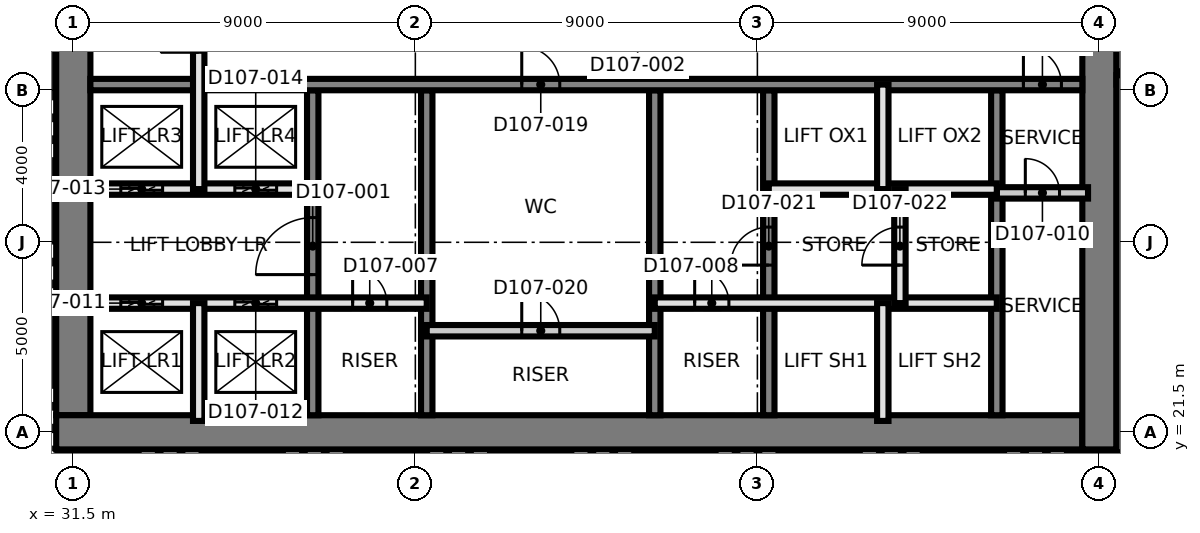
"""IFC4 building model, lengths in metres.
Left out: names, types, materials, properties, quantities, classifications, styles, units other than length and angle.
Written with IfcOpenShell. Run it as: python <this file> out.ifc"""

import sys

from ifc_helpers import new_model, si_unit, direction, frame, frame_2d, origin, place, context, subcontext, project, spatial, rectangle, extrude, element, fill, save


model = new_model("IFC4")
c1 = context("Model", 3, precision=1e-05, world=origin(), true_north=direction((0.0, 1.0)))
c2 = subcontext(c1, "Body", "Model", "MODEL_VIEW")
j1 = project(units=[si_unit("LENGTHUNIT", "METRE"), si_unit("PLANEANGLEUNIT", "RADIAN")], contexts=[c1])
p1 = place(None, origin())
s1 = spatial("IfcSite", under=j1, at=p1, CompositionType="ELEMENT")
p2 = place(p1, origin())
s2 = spatial("IfcBuilding", under=s1, at=p2, CompositionType="ELEMENT")
p3 = place(p2, frame((0.0, 0.0, 28.5)))
s3 = spatial("IfcBuildingStorey", under=s2, at=p3, CompositionType="ELEMENT", Elevation=28.5)
p4 = place(p3, frame((31.5, 21.95, 0.0), z_axis=(0.0, 0.0, 1.0), x_axis=(0.0, 1.0, 0.0)))
e1 = element("IfcWall", 1, at=p4, inside=s3, PredefinedType="SHEAR", context=c2, shape_type="SweptSolid", body=[
    extrude(rectangle(XDim=17.1, YDim=0.9, at=frame_2d((8.55, 0.0))), origin(), (0.0, 0.0, 1.0), 5.0),
])
p5 = place(p3, frame((31.05, 21.5, 0.0), z_axis=(0.0, 0.0, 1.0), x_axis=(1.0, 0.0, 0.0)))
e2 = element("IfcWall", 2, at=p5, inside=s3, PredefinedType="SHEAR", context=c2, shape_type="SweptSolid", body=[
    extrude(rectangle(XDim=27.0, YDim=0.9, at=frame_2d((13.5, 0.0))), origin(), (0.0, 0.0, 1.0), 5.0),
])
p6 = place(p3, frame((58.5, 21.05, 0.0), z_axis=(0.0, 0.0, 1.0), x_axis=(0.0, 1.0, 0.0)))
e3 = element("IfcWall", 3, at=p6, inside=s3, PredefinedType="SHEAR", context=c2, shape_type="SweptSolid", body=[
    extrude(rectangle(XDim=18.9, YDim=0.9, at=frame_2d((9.45, 0.0))), origin(), (0.0, 0.0, 1.0), 5.0),
])
p7 = place(p3, frame((37.8, 21.95, 0.0), z_axis=(0.0, 0.0, 1.0), x_axis=(0.0, 1.0, 0.0)))
e4 = element("IfcWall", 4, at=p7, inside=s3, PredefinedType="SHEAR", context=c2, shape_type="SweptSolid", body=[
    extrude(rectangle(XDim=8.55, YDim=0.3, at=frame_2d((4.275, 0.0))), origin(), (0.0, 0.0, 1.0), 5.0),
])
p8 = place(p7, frame((3.7, 0.0, 0.0)))
e5 = element("IfcOpeningElement", 5, at=p8, cuts=e4, PredefinedType="OPENING", context=c2, shape_type="SweptSolid", body=[
    extrude(rectangle(XDim=1.5, YDim=2.1, at=frame_2d((0.75, 1.05))), frame((0.0, 0.16, 0.0), z_axis=(0.0, -1.0, 0.0), x_axis=(1.0, 0.0, 0.0)), (0.0, 0.0, 1.0), 0.32),
])
for number, where, z_axis, x_axis in (
    (6, (40.8, 21.95, 0.0), (0.0, 0.0, 1.0), (0.0, 1.0, 0.0)),
    (7, (46.8, 21.95, 0.0), (0.0, 0.0, 1.0), (0.0, 1.0, 0.0)),
):
    element("IfcWall", number, at=place(p3, frame(where, z_axis=z_axis, x_axis=x_axis)), inside=s3, PredefinedType="SHEAR", context=c2, shape_type="SweptSolid", body=[
        extrude(rectangle(XDim=8.55, YDim=0.3, at=frame_2d((4.275, 0.0))), origin(), (0.0, 0.0, 1.0), 5.0),
    ])
p9 = place(p3, frame((49.8, 21.95, 0.0), z_axis=(0.0, 0.0, 1.0), x_axis=(0.0, 1.0, 0.0)))
e8 = element("IfcWall", 8, at=p9, inside=s3, PredefinedType="SHEAR", context=c2, shape_type="SweptSolid", body=[
    extrude(rectangle(XDim=8.55, YDim=0.3, at=frame_2d((4.275, 0.0))), origin(), (0.0, 0.0, 1.0), 5.0),
])
p10 = place(p9, frame((3.95, 0.0, 0.0)))
e9 = element("IfcOpeningElement", 9, at=p10, cuts=e8, PredefinedType="OPENING", context=c2, shape_type="SweptSolid", body=[
    extrude(rectangle(XDim=1.0, YDim=2.1, at=frame_2d((0.5, 1.05))), frame((0.0, 0.16, 0.0), z_axis=(0.0, -1.0, 0.0), x_axis=(1.0, 0.0, 0.0)), (0.0, 0.0, 1.0), 0.32),
])
p11 = place(p3, frame((55.8, 21.95, 0.0), z_axis=(0.0, 0.0, 1.0), x_axis=(0.0, 1.0, 0.0)))
e10 = element("IfcWall", 10, at=p11, inside=s3, PredefinedType="SHEAR", context=c2, shape_type="SweptSolid", body=[
    extrude(rectangle(XDim=8.55, YDim=0.3, at=frame_2d((4.275, 0.0))), origin(), (0.0, 0.0, 1.0), 5.0),
])
p12 = place(p3, frame((31.95, 30.65, 0.0), z_axis=(0.0, 0.0, 1.0), x_axis=(1.0, 0.0, 0.0)))
e11 = element("IfcWall", 11, at=p12, inside=s3, PredefinedType="SHEAR", context=c2, shape_type="SweptSolid", body=[
    extrude(rectangle(XDim=26.1, YDim=0.3, at=frame_2d((13.05, 0.0))), origin(), (0.0, 0.0, 1.0), 5.0),
])
p13 = place(p12, frame((24.55, 0.0, 0.0)))
e12 = element("IfcOpeningElement", 12, at=p13, cuts=e11, PredefinedType="OPENING", context=c2, shape_type="SweptSolid", body=[
    extrude(rectangle(XDim=1.0, YDim=2.1, at=frame_2d((0.5, 1.05))), frame((0.0, 0.16, 0.0), z_axis=(0.0, -1.0, 0.0), x_axis=(1.0, 0.0, 0.0)), (0.0, 0.0, 1.0), 0.32),
])
p14 = place(p12, frame((11.35, 0.0, 0.0)))
e13 = element("IfcOpeningElement", 13, at=p14, cuts=e11, PredefinedType="OPENING", context=c2, shape_type="SweptSolid", body=[
    extrude(rectangle(XDim=1.0, YDim=2.1, at=frame_2d((0.5, 1.05))), frame((0.0, 0.16, 0.0), z_axis=(0.0, -1.0, 0.0), x_axis=(1.0, 0.0, 0.0)), (0.0, 0.0, 1.0), 0.32),
])
p15 = place(p3, frame((40.8, 24.173, 0.0), z_axis=(0.0, 0.0, 1.0), x_axis=(1.0, 0.0, 0.0)))
e14 = element("IfcWall", 14, at=p15, inside=s3, PredefinedType="PARTITIONING", context=c2, shape_type="SweptSolid", body=[
    extrude(rectangle(XDim=6.0, YDim=0.3, at=frame_2d((3.0, 0.0))), origin(), (0.0, 0.0, 1.0), 4.7),
])
p16 = place(p15, frame((2.5, 0.0, 0.0)))
e15 = element("IfcOpeningElement", 15, at=p16, cuts=e14, PredefinedType="OPENING", context=c2, shape_type="SweptSolid", body=[
    extrude(rectangle(XDim=1.0, YDim=2.1, at=frame_2d((0.5, 1.05))), frame((0.0, 0.16, 0.0), z_axis=(0.0, -1.0, 0.0), x_axis=(1.0, 0.0, 0.0)), (0.0, 0.0, 1.0), 0.32),
])
p17 = place(p3, frame((31.8, 24.9, 0.0), z_axis=(0.0, 0.0, 1.0), x_axis=(1.0, 0.0, 0.0)))
e16 = element("IfcWall", 16, at=p17, inside=s3, PredefinedType="SOLIDWALL", context=c2, shape_type="SweptSolid", body=[
    extrude(rectangle(XDim=9.0, YDim=0.3, at=frame_2d((4.5, 0.0))), origin(), (0.0, 0.0, 1.0), 4.7),
])
p18 = place(p17, frame((7.05, 0.0, 0.0)))
e17 = element("IfcOpeningElement", 17, at=p18, cuts=e16, PredefinedType="OPENING", context=c2, shape_type="SweptSolid", body=[
    extrude(rectangle(XDim=0.9, YDim=2.1, at=frame_2d((0.45, 1.05))), frame((0.0, 0.16, 0.0), z_axis=(0.0, -1.0, 0.0), x_axis=(1.0, 0.0, 0.0)), (0.0, 0.0, 1.0), 0.32),
])
p19 = place(p17, frame((0.95, 0.0, 0.0)))
e18 = element("IfcOpeningElement", 18, at=p19, cuts=e16, PredefinedType="OPENING", context=c2, shape_type="SweptSolid", body=[
    extrude(rectangle(XDim=1.1, YDim=2.4, at=frame_2d((0.55, 1.2))), frame((0.0, 0.16, 0.0), z_axis=(0.0, -1.0, 0.0), x_axis=(1.0, 0.0, 0.0)), (0.0, 0.0, 1.0), 0.32),
])
p20 = place(p17, frame((3.95, 0.0, 0.0)))
e19 = element("IfcOpeningElement", 19, at=p20, cuts=e16, PredefinedType="OPENING", context=c2, shape_type="SweptSolid", body=[
    extrude(rectangle(XDim=1.1, YDim=2.4, at=frame_2d((0.55, 1.2))), frame((0.0, 0.16, 0.0), z_axis=(0.0, -1.0, 0.0), x_axis=(1.0, 0.0, 0.0)), (0.0, 0.0, 1.0), 0.32),
])
p21 = place(p3, frame((46.8, 24.9, 0.0), z_axis=(0.0, 0.0, 1.0), x_axis=(1.0, 0.0, 0.0)))
e20 = element("IfcWall", 20, at=p21, inside=s3, PredefinedType="SOLIDWALL", context=c2, shape_type="SweptSolid", body=[
    extrude(rectangle(XDim=9.0, YDim=0.3, at=frame_2d((4.5, 0.0))), origin(), (0.0, 0.0, 1.0), 4.7),
])
p22 = place(p21, frame((1.05, 0.0, 0.0)))
e21 = element("IfcOpeningElement", 21, at=p22, cuts=e20, PredefinedType="OPENING", context=c2, shape_type="SweptSolid", body=[
    extrude(rectangle(XDim=0.9, YDim=2.1, at=frame_2d((0.45, 1.05))), frame((0.0, 0.16, 0.0), z_axis=(0.0, -1.0, 0.0), x_axis=(1.0, 0.0, 0.0)), (0.0, 0.0, 1.0), 0.32),
])
p23 = place(p3, frame((55.8, 27.8, 0.0), z_axis=(0.0, 0.0, 1.0), x_axis=(1.0, 0.0, 0.0)))
e22 = element("IfcWall", 22, at=p23, inside=s3, PredefinedType="PARTITIONING", context=c2, shape_type="SweptSolid", body=[
    extrude(rectangle(XDim=2.4, YDim=0.3, at=frame_2d((1.2, 0.0))), origin(), (0.0, 0.0, 1.0), 4.7),
])
p24 = place(p23, frame((0.75, 0.0, 0.0)))
e23 = element("IfcOpeningElement", 23, at=p24, cuts=e22, PredefinedType="OPENING", context=c2, shape_type="SweptSolid", body=[
    extrude(rectangle(XDim=0.9, YDim=2.1, at=frame_2d((0.45, 1.05))), frame((0.0, 0.16, 0.0), z_axis=(0.0, -1.0, 0.0), x_axis=(1.0, 0.0, 0.0)), (0.0, 0.0, 1.0), 0.32),
])
p25 = place(p3, frame((31.8, 27.9, 0.0), z_axis=(0.0, 0.0, 1.0), x_axis=(1.0, 0.0, 0.0)))
e24 = element("IfcWall", 24, at=p25, inside=s3, PredefinedType="SOLIDWALL", context=c2, shape_type="SweptSolid", body=[
    extrude(rectangle(XDim=6.0, YDim=0.3, at=frame_2d((3.0, 0.0))), origin(), (0.0, 0.0, 1.0), 4.7),
])
p26 = place(p25, frame((0.95, 0.0, 0.0)))
e25 = element("IfcOpeningElement", 25, at=p26, cuts=e24, PredefinedType="OPENING", context=c2, shape_type="SweptSolid", body=[
    extrude(rectangle(XDim=1.1, YDim=2.4, at=frame_2d((0.55, 1.2))), frame((0.0, 0.16, 0.0), z_axis=(0.0, -1.0, 0.0), x_axis=(1.0, 0.0, 0.0)), (0.0, 0.0, 1.0), 0.32),
])
p27 = place(p25, frame((3.95, 0.0, 0.0)))
e26 = element("IfcOpeningElement", 26, at=p27, cuts=e24, PredefinedType="OPENING", context=c2, shape_type="SweptSolid", body=[
    extrude(rectangle(XDim=1.1, YDim=2.4, at=frame_2d((0.55, 1.2))), frame((0.0, 0.16, 0.0), z_axis=(0.0, -1.0, 0.0), x_axis=(1.0, 0.0, 0.0)), (0.0, 0.0, 1.0), 0.32),
])
p28 = place(p3, frame((49.8, 27.9, 0.0), z_axis=(0.0, 0.0, 1.0), x_axis=(1.0, 0.0, 0.0)))
e27 = element("IfcWall", 27, at=p28, inside=s3, PredefinedType="SOLIDWALL", context=c2, shape_type="SweptSolid", body=[
    extrude(rectangle(XDim=6.0, YDim=0.3, at=frame_2d((3.0, 0.0))), origin(), (0.0, 0.0, 1.0), 4.7),
])
p29 = place(p3, frame((34.8, 21.8, 0.0), z_axis=(0.0, 0.0, 1.0), x_axis=(0.0, 1.0, 0.0)))
e28 = element("IfcWall", 28, at=p29, inside=s3, PredefinedType="SOLIDWALL", context=c2, shape_type="SweptSolid", body=[
    extrude(rectangle(XDim=3.1, YDim=0.3, at=frame_2d((1.55, 0.0))), origin(), (0.0, 0.0, 1.0), 4.7),
])
p30 = place(p3, frame((34.8, 27.9, 0.0), z_axis=(0.0, 0.0, 1.0), x_axis=(0.0, 1.0, 0.0)))
e29 = element("IfcWall", 29, at=p30, inside=s3, PredefinedType="SOLIDWALL", context=c2, shape_type="SweptSolid", body=[
    extrude(rectangle(XDim=5.45, YDim=0.3, at=frame_2d((2.725, 0.0))), origin(), (0.0, 0.0, 1.0), 4.7),
])
p31 = place(p30, frame((3.6, 0.0, 0.0)))
e30 = element("IfcOpeningElement", 30, at=p31, cuts=e29, PredefinedType="OPENING", context=c2, shape_type="SweptSolid", body=[
    extrude(rectangle(XDim=1.0, YDim=2.1, at=frame_2d((0.5, 1.05))), frame((0.0, 0.16, 0.0), z_axis=(0.0, -1.0, 0.0), x_axis=(1.0, 0.0, 0.0)), (0.0, 0.0, 1.0), 0.32),
])
p32 = place(p3, frame((52.8, 21.8, 0.0), z_axis=(0.0, 0.0, 1.0), x_axis=(0.0, 1.0, 0.0)))
e31 = element("IfcWall", 31, at=p32, inside=s3, PredefinedType="SOLIDWALL", context=c2, shape_type="SweptSolid", body=[
    extrude(rectangle(XDim=3.1, YDim=0.3, at=frame_2d((1.55, 0.0))), origin(), (0.0, 0.0, 1.0), 4.7),
])
p33 = place(p3, frame((52.8, 27.9, 0.0), z_axis=(0.0, 0.0, 1.0), x_axis=(0.0, 1.0, 0.0)))
e32 = element("IfcWall", 32, at=p33, inside=s3, PredefinedType="SOLIDWALL", context=c2, shape_type="SweptSolid", body=[
    extrude(rectangle(XDim=2.75, YDim=0.3, at=frame_2d((1.375, 0.0))), origin(), (0.0, 0.0, 1.0), 4.7),
])
p34 = place(p3, frame((53.25, 24.9, 0.0), z_axis=(0.0, 0.0, 1.0), x_axis=(0.0, 1.0, 0.0)))
e33 = element("IfcWall", 33, at=p34, inside=s3, PredefinedType="SOLIDWALL", context=c2, shape_type="SweptSolid", body=[
    extrude(rectangle(XDim=3.0, YDim=0.3, at=frame_2d((1.5, 0.0))), origin(), (0.0, 0.0, 1.0), 4.7),
])
p35 = place(p34, frame((1.0, 0.0, 0.0)))
e34 = element("IfcOpeningElement", 34, at=p35, cuts=e33, PredefinedType="OPENING", context=c2, shape_type="SweptSolid", body=[
    extrude(rectangle(XDim=1.0, YDim=2.1, at=frame_2d((0.5, 1.05))), frame((0.0, 0.16, 0.0), z_axis=(0.0, -1.0, 0.0), x_axis=(1.0, 0.0, 0.0)), (0.0, 0.0, 1.0), 0.32),
])
p36 = place(p3, frame((59.1, 30.65, 0.0), z_axis=(0.0, 0.0, 1.0), x_axis=(0.0, 1.0, 0.0)))
e35 = element("IfcWall", 35, at=p36, inside=s3, PredefinedType="PARTITIONING", context=c2, shape_type="SweptSolid", body=[
    extrude(rectangle(XDim=2.7, YDim=0.3, at=frame_2d((1.35, 0.0))), origin(), (0.0, 0.0, 1.0), 4.7),
])
p37 = place(p3, frame((58.97, 30.9, 0.0), z_axis=(0.0, 0.0, 1.0), x_axis=(1.0, 0.0, 0.0)))
e36 = element("IfcWall", 36, at=p37, inside=s3, PredefinedType="PARTITIONING", context=c2, shape_type="SweptSolid", body=[
    extrude(rectangle(XDim=23.53, YDim=0.2, at=frame_2d((11.765, 0.0))), origin(), (0.0, 0.0, 1.0), 4.7),
])
p38 = place(p37, frame((13.18, 0.0, 0.0)))
e37 = element("IfcOpeningElement", 37, at=p38, cuts=e36, PredefinedType="OPENING", context=c2, shape_type="SweptSolid", body=[
    extrude(rectangle(XDim=1.0, YDim=2.1, at=frame_2d((0.5, 1.05))), frame((0.0, 0.11, 0.0), z_axis=(0.0, -1.0, 0.0), x_axis=(1.0, 0.0, 0.0)), (0.0, 0.0, 1.0), 0.22),
])
p39 = place(p3, frame((59.05, 11.07, 0.0), z_axis=(0.0, 0.0, 1.0), x_axis=(0.0, 1.0, 0.0)))
e38 = element("IfcWall", 38, at=p39, inside=s3, PredefinedType="PARTITIONING", context=c2, shape_type="SweptSolid", body=[
    extrude(rectangle(XDim=19.83, YDim=0.2, at=frame_2d((9.915, 0.0))), origin(), (0.0, 0.0, 1.0), 4.7),
])
p40 = place(p8, origin())
e39 = element("IfcDoor", 39, at=p40, inside=s3, OperationType="SINGLE_SWING_LEFT", PredefinedType="DOOR", context=c2, shape_type="SweptSolid", body=[
    extrude(rectangle(XDim=1.5, YDim=2.1, at=frame_2d((0.75, 1.05))), frame((0.0, 0.025, 0.0), z_axis=(0.0, -1.0, 0.0), x_axis=(1.0, 0.0, 0.0)), (0.0, 0.0, 1.0), 0.05),
])
fill(e5, e39)
p41 = place(p18, origin())
e40 = element("IfcDoor", 40, at=p41, inside=s3, OperationType="SINGLE_SWING_LEFT", PredefinedType="DOOR", context=c2, shape_type="SweptSolid", body=[
    extrude(rectangle(XDim=0.9, YDim=2.1, at=frame_2d((0.45, 1.05))), frame((0.0, 0.025, 0.0), z_axis=(0.0, -1.0, 0.0), x_axis=(1.0, 0.0, 0.0)), (0.0, 0.0, 1.0), 0.05),
])
fill(e17, e40)
p42 = place(p22, origin())
e41 = element("IfcDoor", 41, at=p42, inside=s3, OperationType="SINGLE_SWING_RIGHT", PredefinedType="DOOR", context=c2, shape_type="SweptSolid", body=[
    extrude(rectangle(XDim=0.9, YDim=2.1, at=frame_2d((0.45, 1.05))), frame((0.0, 0.025, 0.0), z_axis=(0.0, -1.0, 0.0), x_axis=(1.0, 0.0, 0.0)), (0.0, 0.0, 1.0), 0.05),
])
fill(e21, e41)
p43 = place(p13, origin())
e42 = element("IfcDoor", 42, at=p43, inside=s3, OperationType="SINGLE_SWING_LEFT", PredefinedType="DOOR", context=c2, shape_type="SweptSolid", body=[
    extrude(rectangle(XDim=1.0, YDim=2.1, at=frame_2d((0.5, 1.05))), frame((0.0, 0.025, 0.0), z_axis=(0.0, -1.0, 0.0), x_axis=(1.0, 0.0, 0.0)), (0.0, 0.0, 1.0), 0.05),
])
fill(e12, e42)
p44 = place(p24, origin())
e43 = element("IfcDoor", 43, at=p44, inside=s3, OperationType="SINGLE_SWING_RIGHT", PredefinedType="DOOR", context=c2, shape_type="SweptSolid", body=[
    extrude(rectangle(XDim=0.9, YDim=2.1, at=frame_2d((0.45, 1.05))), frame((0.0, 0.025, 0.0), z_axis=(0.0, -1.0, 0.0), x_axis=(1.0, 0.0, 0.0)), (0.0, 0.0, 1.0), 0.05),
])
fill(e23, e43)
p45 = place(p19, origin())
e44 = element("IfcDoor", 44, at=p45, inside=s3, OperationType="SLIDING_TO_LEFT", PredefinedType="DOOR", context=c2, shape_type="SweptSolid", body=[
    extrude(rectangle(XDim=1.1, YDim=2.4, at=frame_2d((0.55, 1.2))), frame((0.0, 0.025, 0.0), z_axis=(0.0, -1.0, 0.0), x_axis=(1.0, 0.0, 0.0)), (0.0, 0.0, 1.0), 0.05),
])
fill(e18, e44)
p46 = place(p20, origin())
e45 = element("IfcDoor", 45, at=p46, inside=s3, OperationType="SLIDING_TO_LEFT", PredefinedType="DOOR", context=c2, shape_type="SweptSolid", body=[
    extrude(rectangle(XDim=1.1, YDim=2.4, at=frame_2d((0.55, 1.2))), frame((0.0, 0.025, 0.0), z_axis=(0.0, -1.0, 0.0), x_axis=(1.0, 0.0, 0.0)), (0.0, 0.0, 1.0), 0.05),
])
fill(e19, e45)
p47 = place(p26, origin())
e46 = element("IfcDoor", 46, at=p47, inside=s3, OperationType="SLIDING_TO_LEFT", PredefinedType="DOOR", context=c2, shape_type="SweptSolid", body=[
    extrude(rectangle(XDim=1.1, YDim=2.4, at=frame_2d((0.55, 1.2))), frame((0.0, 0.025, 0.0), z_axis=(0.0, -1.0, 0.0), x_axis=(1.0, 0.0, 0.0)), (0.0, 0.0, 1.0), 0.05),
])
fill(e25, e46)
p48 = place(p27, origin())
e47 = element("IfcDoor", 47, at=p48, inside=s3, OperationType="SLIDING_TO_LEFT", PredefinedType="DOOR", context=c2, shape_type="SweptSolid", body=[
    extrude(rectangle(XDim=1.1, YDim=2.4, at=frame_2d((0.55, 1.2))), frame((0.0, 0.025, 0.0), z_axis=(0.0, -1.0, 0.0), x_axis=(1.0, 0.0, 0.0)), (0.0, 0.0, 1.0), 0.05),
])
fill(e26, e47)
p49 = place(p14, origin())
e48 = element("IfcDoor", 48, at=p49, inside=s3, OperationType="SINGLE_SWING_LEFT", PredefinedType="DOOR", context=c2, shape_type="SweptSolid", body=[
    extrude(rectangle(XDim=1.0, YDim=2.1, at=frame_2d((0.5, 1.05))), frame((0.0, 0.025, 0.0), z_axis=(0.0, -1.0, 0.0), x_axis=(1.0, 0.0, 0.0)), (0.0, 0.0, 1.0), 0.05),
])
fill(e13, e48)
p50 = place(p16, origin())
e49 = element("IfcDoor", 49, at=p50, inside=s3, OperationType="SINGLE_SWING_RIGHT", PredefinedType="DOOR", context=c2, shape_type="SweptSolid", body=[
    extrude(rectangle(XDim=1.0, YDim=2.1, at=frame_2d((0.5, 1.05))), frame((0.0, 0.025, 0.0), z_axis=(0.0, -1.0, 0.0), x_axis=(1.0, 0.0, 0.0)), (0.0, 0.0, 1.0), 0.05),
])
fill(e15, e49)
p51 = place(p10, origin())
e50 = element("IfcDoor", 50, at=p51, inside=s3, OperationType="SINGLE_SWING_LEFT", PredefinedType="DOOR", context=c2, shape_type="SweptSolid", body=[
    extrude(rectangle(XDim=1.0, YDim=2.1, at=frame_2d((0.5, 1.05))), frame((0.0, 0.025, 0.0), z_axis=(0.0, -1.0, 0.0), x_axis=(1.0, 0.0, 0.0)), (0.0, 0.0, 1.0), 0.05),
])
fill(e9, e50)
p52 = place(p35, origin())
e51 = element("IfcDoor", 51, at=p52, inside=s3, OperationType="SINGLE_SWING_RIGHT", PredefinedType="DOOR", context=c2, shape_type="SweptSolid", body=[
    extrude(rectangle(XDim=1.0, YDim=2.1, at=frame_2d((0.5, 1.05))), frame((0.0, 0.025, 0.0), z_axis=(0.0, -1.0, 0.0), x_axis=(1.0, 0.0, 0.0)), (0.0, 0.0, 1.0), 0.05),
])
fill(e34, e51)
save(model, sys.argv[1])
